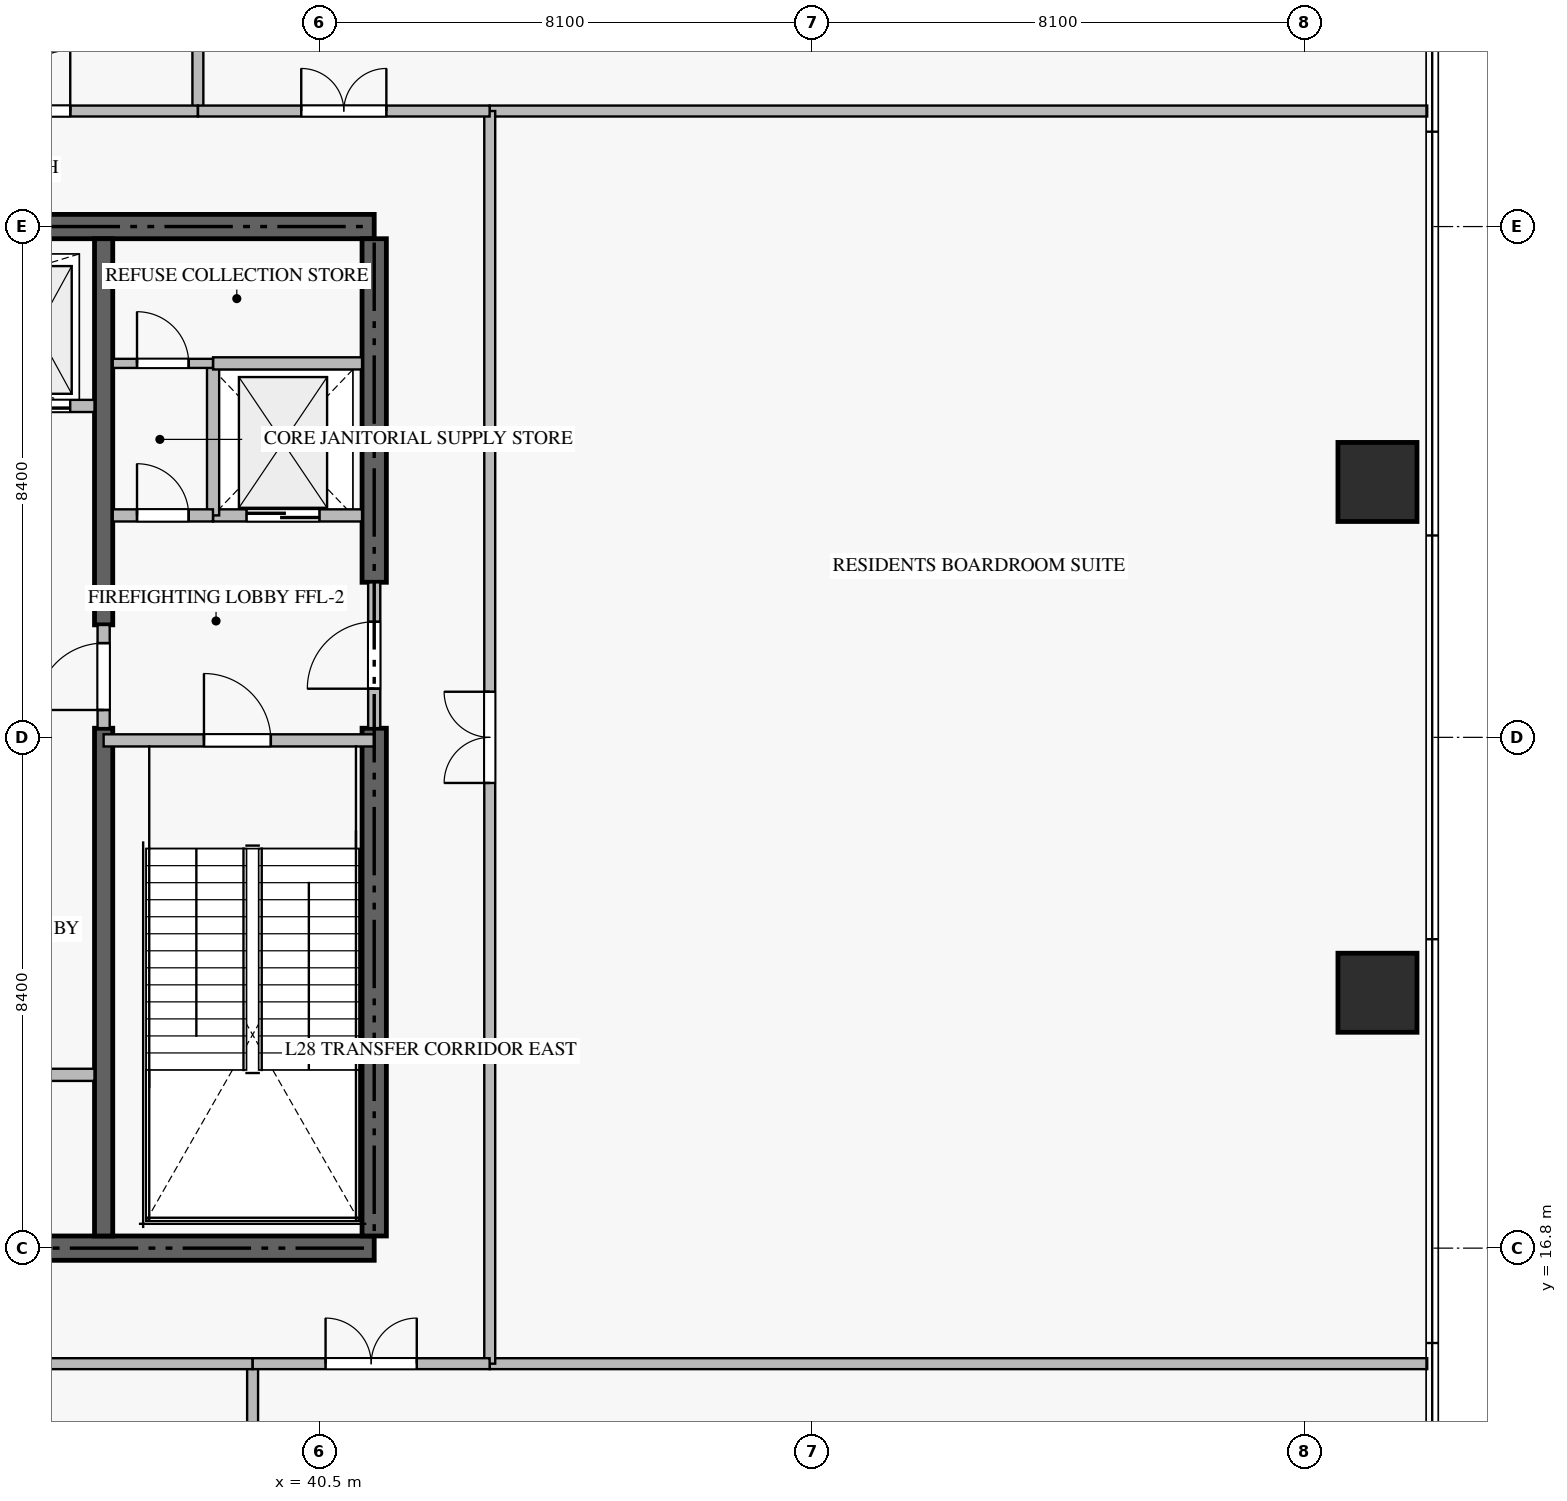
"""IFC4 building model, lengths in metres.
Left out: names, types, materials, properties, quantities, classifications, styles, units other than length and angle.
Written with IfcOpenShell. Run it as: python <this file> out.ifc"""

import sys

from ifc_helpers import new_model, si_unit, direction, frame, frame_2d, origin, origin_2d, place, context, subcontext, project, spatial, rectangle, extrude, source, transform, mapped, element, fill, save


model = new_model("IFC4")
c1 = context("Model", 3, precision=1e-05, world=origin(), true_north=direction((0.0, 1.0)))
c2 = subcontext(c1, "Body", "Model", "MODEL_VIEW")
j1 = project(units=[si_unit("LENGTHUNIT", "METRE"), si_unit("PLANEANGLEUNIT", "RADIAN")], contexts=[c1])
p1 = place(None, origin())
s1 = spatial("IfcSite", under=j1, at=p1, CompositionType="ELEMENT")
p2 = place(p1, origin())
s2 = spatial("IfcBuilding", under=s1, at=p2, CompositionType="ELEMENT")
p3 = place(p2, frame((0.0, 0.0, 115.2)))
s3 = spatial("IfcBuildingStorey", under=s2, at=p3, CompositionType="ELEMENT", Elevation=115.2)
for number, where, z_axis, x_axis in (
    (1, (23.4, 16.8, -0.36), (0.0, 0.0, 1.0), (1.0, 0.0, 0.0)),
    (2, (41.4, 33.6, -0.36), (0.0, 0.0, 1.0), (-1.0, 0.0, 0.0)),
):
    element("IfcWall", number, at=place(p3, frame(where, z_axis=z_axis, x_axis=x_axis)), inside=s3, PredefinedType="SHEAR", context=c2, shape_type="SweptSolid", body=[
        extrude(rectangle(XDim=18.0, YDim=0.4, at=frame_2d((9.0, 0.0))), origin(), (0.0, 0.0, 1.0), 4.868),
    ])
p4 = place(p3, frame((41.4, 17.0, -0.36), z_axis=(0.0, 0.0, 1.0), x_axis=(0.0, 1.0, 0.0)))
e3 = element("IfcWall", 3, at=p4, inside=s3, PredefinedType="SHEAR", context=c2, shape_type="SweptSolid", body=[
    extrude(rectangle(XDim=8.35, YDim=0.4, at=frame_2d((4.175, 0.0))), origin(), (0.0, 0.0, 1.0), 4.868),
])
p5 = place(p3, frame((41.4, 27.75, -0.36), z_axis=(0.0, 0.0, 1.0), x_axis=(0.0, 1.0, 0.0)))
e4 = element("IfcWall", 4, at=p5, inside=s3, PredefinedType="SHEAR", context=c2, shape_type="SweptSolid", body=[
    extrude(rectangle(XDim=5.65, YDim=0.4, at=frame_2d((2.825, 0.0))), origin(), (0.0, 0.0, 1.0), 4.868),
])
p6 = place(p3, frame((36.95, 17.0, -0.36), z_axis=(0.0, 0.0, 1.0), x_axis=(0.0, 1.0, 0.0)))
e5 = element("IfcWall", 5, at=p6, inside=s3, PredefinedType="SHEAR", context=c2, shape_type="SweptSolid", body=[
    extrude(rectangle(XDim=8.35, YDim=0.3, at=frame_2d((4.175, 0.0))), origin(), (0.0, 0.0, 1.0), 4.868),
])
p7 = place(p3, frame((36.95, 27.05, -0.36), z_axis=(0.0, 0.0, 1.0), x_axis=(0.0, 1.0, 0.0)))
e6 = element("IfcWall", 6, at=p7, inside=s3, PredefinedType="SHEAR", context=c2, shape_type="SweptSolid", body=[
    extrude(rectangle(XDim=6.35, YDim=0.3, at=frame_2d((3.175, 0.0))), origin(), (0.0, 0.0, 1.0), 4.868),
])
m1 = source(origin(), c2, "Body", "SweptSolid", [
    extrude(rectangle(XDim=1.3, YDim=1.3, at=origin_2d()), origin(), (0.0, 0.0, 1.0), 4.87),
])
for number, where, z_axis, x_axis in (
    (7, (57.9, 21.0, -0.36), (0.0, 0.0, 1.0), (1.0, 0.0, 0.0)),
    (8, (57.9, 29.4, -0.36), (0.0, 0.0, 1.0), (1.0, 0.0, 0.0)),
):
    element("IfcColumn", number, at=place(p3, frame(where, z_axis=z_axis, x_axis=x_axis)), inside=s3, PredefinedType="COLUMN", context=c2, shape_type="MappedRepresentation", body=[
        mapped(m1, transform((0.0, 0.0, 0.0), scale=1.0)),
    ])
p8 = place(p3, frame((36.95, 25.15, 0.0), z_axis=(0.0, 0.0, 1.0), x_axis=(1.0, 0.0, 0.0)))
e9 = element("IfcWall", 9, at=p8, inside=s3, PredefinedType="STANDARD", context=c2, shape_type="SweptSolid", body=[
    extrude(rectangle(XDim=4.45, YDim=0.2, at=frame_2d((2.225, 0.0))), origin(), (0.0, 0.0, 1.0), 4.51),
])
p9 = place(p8, frame((1.65, 0.0, 0.0)))
e10 = element("IfcOpeningElement", 10, at=p9, cuts=e9, PredefinedType="OPENING", context=c2, shape_type="SweptSolid", body=[
    extrude(rectangle(XDim=1.1, YDim=2.15, at=frame_2d((0.55, 1.075))), frame((0.0, 0.11, 0.0), z_axis=(0.0, -1.0, 0.0), x_axis=(1.0, 0.0, 0.0)), (0.0, 0.0, 1.0), 0.22),
])
p10 = place(p3, frame((38.75, 28.85, 0.0), z_axis=(0.0, 0.0, 1.0), x_axis=(1.0, 0.0, 0.0)))
e11 = element("IfcWall", 11, at=p10, inside=s3, PredefinedType="STANDARD", context=c2, shape_type="SweptSolid", body=[
    extrude(rectangle(XDim=2.45, YDim=0.2, at=frame_2d((1.225, 0.0))), origin(), (0.0, 0.0, 1.0), 4.51),
])
p11 = place(p10, frame((0.55, 0.0, 0.0)))
e12 = element("IfcOpeningElement", 12, at=p11, cuts=e11, PredefinedType="OPENING", context=c2, shape_type="SweptSolid", body=[
    extrude(rectangle(XDim=1.2, YDim=2.2, at=frame_2d((0.6, 1.1))), frame((0.0, 0.11, 0.0), z_axis=(0.0, -1.0, 0.0), x_axis=(1.0, 0.0, 0.0)), (0.0, 0.0, 1.0), 0.22),
])
p12 = place(p3, frame((33.05, 19.65, 0.0), z_axis=(0.0, 0.0, 1.0), x_axis=(1.0, 0.0, 0.0)))
e13 = element("IfcWall", 13, at=p12, inside=s3, PredefinedType="STANDARD", context=c2, shape_type="SweptSolid", body=[
    extrude(rectangle(XDim=3.75, YDim=0.2, at=frame_2d((1.875, 0.0))), origin(), (0.0, 0.0, 1.0), 4.51),
])
p13 = place(p12, frame((0.65, 0.0, 0.0)))
e14 = element("IfcOpeningElement", 14, at=p13, cuts=e13, PredefinedType="OPENING", context=c2, shape_type="SweptSolid", body=[
    extrude(rectangle(XDim=1.1, YDim=2.2, at=frame_2d((0.55, 1.1))), frame((0.0, 0.11, 0.0), z_axis=(0.0, -1.0, 0.0), x_axis=(1.0, 0.0, 0.0)), (0.0, 0.0, 1.0), 0.22),
])
p14 = place(p3, frame((35.0, 30.65, 0.0), z_axis=(0.0, 0.0, 1.0), x_axis=(1.0, 0.0, 0.0)))
e15 = element("IfcWall", 15, at=p14, inside=s3, PredefinedType="STANDARD", context=c2, shape_type="SweptSolid", body=[
    extrude(rectangle(XDim=1.8, YDim=0.2, at=frame_2d((0.9, 0.0))), origin(), (0.0, 0.0, 1.0), 4.51),
])
p15 = place(p14, frame((0.3, 0.0, 0.0)))
e16 = element("IfcOpeningElement", 16, at=p15, cuts=e15, PredefinedType="OPENING", context=c2, shape_type="SweptSolid", body=[
    extrude(rectangle(XDim=1.1, YDim=2.2, at=frame_2d((0.55, 1.1))), frame((0.0, 0.11, 0.0), z_axis=(0.0, -1.0, 0.0), x_axis=(1.0, 0.0, 0.0)), (0.0, 0.0, 1.0), 0.22),
])
p16 = place(p3, frame((38.75, 28.85, 0.0), z_axis=(0.0, 0.0, 1.0), x_axis=(0.0, 1.0, 0.0)))
e17 = element("IfcWall", 17, at=p16, inside=s3, PredefinedType="STANDARD", context=c2, shape_type="SweptSolid", body=[
    extrude(rectangle(XDim=2.5, YDim=0.2, at=frame_2d((1.25, 0.0))), origin(), (0.0, 0.0, 1.0), 4.51),
])
p17 = place(p3, frame((38.75, 31.35, 0.0), z_axis=(0.0, 0.0, 1.0), x_axis=(1.0, 0.0, 0.0)))
e18 = element("IfcWall", 18, at=p17, inside=s3, PredefinedType="STANDARD", context=c2, shape_type="SweptSolid", body=[
    extrude(rectangle(XDim=2.45, YDim=0.2, at=frame_2d((1.225, 0.0))), origin(), (0.0, 0.0, 1.0), 4.51),
])
p18 = place(p3, frame((37.1, 28.85, 0.0), z_axis=(0.0, 0.0, 1.0), x_axis=(1.0, 0.0, 0.0)))
e19 = element("IfcWall", 19, at=p18, inside=s3, PredefinedType="STANDARD", context=c2, shape_type="SweptSolid", body=[
    extrude(rectangle(XDim=1.648, YDim=0.2, at=frame_2d((0.824, 0.0))), origin(), (0.0, 0.0, 1.0), 4.51),
])
p19 = place(p18, frame((0.399, 0.0, 0.0)))
e20 = element("IfcOpeningElement", 20, at=p19, cuts=e19, PredefinedType="OPENING", context=c2, shape_type="SweptSolid", body=[
    extrude(rectangle(XDim=0.85, YDim=2.1, at=frame_2d((0.425, 1.05))), frame((0.0, 0.11, 0.0), z_axis=(0.0, -1.0, 0.0), x_axis=(1.0, 0.0, 0.0)), (0.0, 0.0, 1.0), 0.22),
])
p20 = place(p3, frame((41.4, 25.352, 0.0), z_axis=(0.0, 0.0, 1.0), x_axis=(0.0, 1.0, 0.0)))
e21 = element("IfcWall", 21, at=p20, inside=s3, PredefinedType="STANDARD", context=c2, shape_type="SweptSolid", body=[
    extrude(rectangle(XDim=2.396, YDim=0.2, at=frame_2d((1.198, 0.0))), origin(), (0.0, 0.0, 1.0), 4.51),
])
p21 = place(p20, frame((0.648, 0.0, 0.0)))
e22 = element("IfcOpeningElement", 22, at=p21, cuts=e21, PredefinedType="OPENING", context=c2, shape_type="SweptSolid", body=[
    extrude(rectangle(XDim=1.1, YDim=2.15, at=frame_2d((0.55, 1.075))), frame((0.0, 0.11, 0.0), z_axis=(0.0, -1.0, 0.0), x_axis=(1.0, 0.0, 0.0)), (0.0, 0.0, 1.0), 0.22),
])
p22 = place(p3, frame((36.95, 25.352, 0.0), z_axis=(0.0, 0.0, 1.0), x_axis=(0.0, 1.0, 0.0)))
e23 = element("IfcWall", 23, at=p22, inside=s3, PredefinedType="STANDARD", context=c2, shape_type="SweptSolid", body=[
    extrude(rectangle(XDim=1.696, YDim=0.2, at=frame_2d((0.848, 0.0))), origin(), (0.0, 0.0, 1.0), 4.51),
])
p23 = place(p22, frame((0.298, 0.0, 0.0)))
e24 = element("IfcOpeningElement", 24, at=p23, cuts=e23, PredefinedType="OPENING", context=c2, shape_type="SweptSolid", body=[
    extrude(rectangle(XDim=1.1, YDim=2.15, at=frame_2d((0.55, 1.075))), frame((0.0, 0.11, 0.0), z_axis=(0.0, -1.0, 0.0), x_axis=(1.0, 0.0, 0.0)), (0.0, 0.0, 1.0), 0.22),
])
p24 = place(p3, frame((37.1, 31.35, 0.0), z_axis=(0.0, 0.0, 1.0), x_axis=(1.0, 0.0, 0.0)))
e25 = element("IfcWall", 25, at=p24, inside=s3, PredefinedType="PARTITIONING", context=c2, shape_type="SweptSolid", body=[
    extrude(rectangle(XDim=1.648, YDim=0.15, at=frame_2d((0.824, 0.0))), origin(), (0.0, 0.0, 1.0), 4.51),
])
p25 = place(p24, frame((0.399, 0.0, 0.0)))
e26 = element("IfcOpeningElement", 26, at=p25, cuts=e25, PredefinedType="OPENING", context=c2, shape_type="SweptSolid", body=[
    extrude(rectangle(XDim=0.85, YDim=2.1, at=frame_2d((0.425, 1.05))), frame((0.0, 0.085, 0.0), z_axis=(0.0, -1.0, 0.0), x_axis=(1.0, 0.0, 0.0)), (0.0, 0.0, 1.0), 0.17),
])
for number, where, z_axis, x_axis in (
    (27, (43.3, 14.9, 0.0), (0.0, 0.0, 1.0), (1.0, 0.0, 0.0)),
    (28, (43.3, 35.5, 0.0), (0.0, 0.0, 1.0), (1.0, 0.0, 0.0)),
):
    element("IfcWall", number, at=place(p3, frame(where, z_axis=z_axis, x_axis=x_axis)), inside=s3, PredefinedType="PARTITIONING", context=c2, shape_type="SweptSolid", body=[
        extrude(rectangle(XDim=15.418, YDim=0.18, at=frame_2d((7.709, 0.0))), origin(), (0.0, 0.0, 1.0), 4.51),
    ])
p26 = place(p3, frame((43.3, 14.9, 0.0), z_axis=(0.0, 0.0, 1.0), x_axis=(0.0, 1.0, 0.0)))
e29 = element("IfcWall", 29, at=p26, inside=s3, PredefinedType="PARTITIONING", context=c2, shape_type="SweptSolid", body=[
    extrude(rectangle(XDim=20.6, YDim=0.18, at=frame_2d((10.3, 0.0))), origin(), (0.0, 0.0, 1.0), 4.51),
])
p27 = place(p26, frame((9.55, 0.0, 0.0)))
e30 = element("IfcOpeningElement", 30, at=p27, cuts=e29, PredefinedType="OPENING", context=c2, shape_type="SweptSolid", body=[
    extrude(rectangle(XDim=1.5, YDim=2.25, at=frame_2d((0.75, 1.125))), frame((0.0, 0.1, 0.0), z_axis=(0.0, -1.0, 0.0), x_axis=(1.0, 0.0, 0.0)), (0.0, 0.0, 1.0), 0.2),
])
for number, where, z_axis, x_axis in (
    (31, (39.4, 0.282, 0.0), (0.0, 0.0, 1.0), (0.0, 1.0, 0.0)),
    (32, (38.5, 35.5, 0.0), (0.0, 0.0, 1.0), (0.0, 1.0, 0.0)),
):
    element("IfcWall", number, at=place(p3, frame(where, z_axis=z_axis, x_axis=x_axis)), inside=s3, PredefinedType="PARTITIONING", context=c2, shape_type="SweptSolid", body=[
        extrude(rectangle(XDim=14.618, YDim=0.18, at=frame_2d((7.309, 0.0))), origin(), (0.0, 0.0, 1.0), 4.51),
    ])
p28 = place(p3, frame((25.602, 14.9, 0.0), z_axis=(0.0, 0.0, 1.0), x_axis=(1.0, 0.0, 0.0)))
e33 = element("IfcWall", 33, at=p28, inside=s3, PredefinedType="PARTITIONING", context=c2, shape_type="SweptSolid", body=[
    extrude(rectangle(XDim=13.798, YDim=0.18, at=frame_2d((6.899, 0.0))), origin(), (0.0, 0.0, 1.0), 4.51),
])
p29 = place(p28, frame((6.099, 0.0, 0.0)))
e34 = element("IfcOpeningElement", 34, at=p29, cuts=e33, PredefinedType="OPENING", context=c2, shape_type="SweptSolid", body=[
    extrude(rectangle(XDim=1.6, YDim=2.3, at=frame_2d((0.8, 1.15))), frame((0.0, 0.1, 0.0), z_axis=(0.0, -1.0, 0.0), x_axis=(1.0, 0.0, 0.0)), (0.0, 0.0, 1.0), 0.2),
])
p30 = place(p3, frame((39.402, 14.9, 0.0), z_axis=(0.0, 0.0, 1.0), x_axis=(1.0, 0.0, 0.0)))
e35 = element("IfcWall", 35, at=p30, inside=s3, PredefinedType="PARTITIONING", context=c2, shape_type="SweptSolid", body=[
    extrude(rectangle(XDim=3.896, YDim=0.18, at=frame_2d((1.948, 0.0))), origin(), (0.0, 0.0, 1.0), 4.51),
])
p31 = place(p30, frame((1.198, 0.0, 0.0)))
e36 = element("IfcOpeningElement", 36, at=p31, cuts=e35, PredefinedType="OPENING", context=c2, shape_type="SweptSolid", body=[
    extrude(rectangle(XDim=1.5, YDim=2.25, at=frame_2d((0.75, 1.125))), frame((0.0, 0.1, 0.0), z_axis=(0.0, -1.0, 0.0), x_axis=(1.0, 0.0, 0.0)), (0.0, 0.0, 1.0), 0.2),
])
p32 = place(p3, frame((33.302, 35.5, 0.0), z_axis=(0.0, 0.0, 1.0), x_axis=(1.0, 0.0, 0.0)))
e37 = element("IfcWall", 37, at=p32, inside=s3, PredefinedType="PARTITIONING", context=c2, shape_type="SweptSolid", body=[
    extrude(rectangle(XDim=5.198, YDim=0.18, at=frame_2d((2.599, 0.0))), origin(), (0.0, 0.0, 1.0), 4.51),
])
p33 = place(p32, frame((2.099, 0.0, 0.0)))
e38 = element("IfcOpeningElement", 38, at=p33, cuts=e37, PredefinedType="OPENING", context=c2, shape_type="SweptSolid", body=[
    extrude(rectangle(XDim=1.0, YDim=2.15, at=frame_2d((0.5, 1.075))), frame((0.0, 0.1, 0.0), z_axis=(0.0, -1.0, 0.0), x_axis=(1.0, 0.0, 0.0)), (0.0, 0.0, 1.0), 0.2),
])
p34 = place(p3, frame((38.502, 35.5, 0.0), z_axis=(0.0, 0.0, 1.0), x_axis=(1.0, 0.0, 0.0)))
e39 = element("IfcWall", 39, at=p34, inside=s3, PredefinedType="PARTITIONING", context=c2, shape_type="SweptSolid", body=[
    extrude(rectangle(XDim=4.796, YDim=0.18, at=frame_2d((2.398, 0.0))), origin(), (0.0, 0.0, 1.0), 4.51),
])
p35 = place(p34, frame((1.698, 0.0, 0.0)))
e40 = element("IfcOpeningElement", 40, at=p35, cuts=e39, PredefinedType="OPENING", context=c2, shape_type="SweptSolid", body=[
    extrude(rectangle(XDim=1.4, YDim=2.25, at=frame_2d((0.7, 1.125))), frame((0.0, 0.1, 0.0), z_axis=(0.0, -1.0, 0.0), x_axis=(1.0, 0.0, 0.0)), (0.0, 0.0, 1.0), 0.2),
])
m2 = source(origin(), c2, "Body", "SweptSolid", [
    extrude(rectangle(XDim=1.1, YDim=2.15, at=frame_2d((0.55, 1.075))), frame((0.0, 0.025, 0.0), z_axis=(0.0, -1.0, 0.0), x_axis=(1.0, 0.0, 0.0)), (0.0, 0.0, 1.0), 0.05),
])
p36 = place(p9, origin())
e41 = element("IfcDoor", 41, at=p36, inside=s3, OperationType="SINGLE_SWING_LEFT", PredefinedType="DOOR", context=c2, shape_type="MappedRepresentation", body=[
    mapped(m2, transform((0.0, 0.0, 0.0), scale=1.0)),
])
fill(e10, e41)
m3 = source(origin(), c2, "Body", "SweptSolid", [
    extrude(rectangle(XDim=1.2, YDim=2.2, at=frame_2d((0.6, 1.1))), frame((0.0, 0.025, 0.0), z_axis=(0.0, -1.0, 0.0), x_axis=(1.0, 0.0, 0.0)), (0.0, 0.0, 1.0), 0.05),
])
p37 = place(p11, origin())
e42 = element("IfcDoor", 42, at=p37, inside=s3, OperationType="DOUBLE_DOOR_SLIDING", PredefinedType="DOOR", context=c2, shape_type="MappedRepresentation", body=[
    mapped(m3, transform((0.0, 0.0, 0.0), scale=1.0)),
])
fill(e12, e42)
m4 = source(origin(), c2, "Body", "SweptSolid", [
    extrude(rectangle(XDim=1.1, YDim=2.2, at=frame_2d((0.55, 1.1))), frame((0.0, 0.025, 0.0), z_axis=(0.0, -1.0, 0.0), x_axis=(1.0, 0.0, 0.0)), (0.0, 0.0, 1.0), 0.05),
])
p38 = place(p15, origin())
e43 = element("IfcDoor", 43, at=p38, inside=s3, OperationType="DOUBLE_DOOR_SLIDING", PredefinedType="DOOR", context=c2, shape_type="MappedRepresentation", body=[
    mapped(m4, transform((0.0, 0.0, 0.0), scale=1.0)),
])
fill(e16, e43)
m5 = source(origin(), c2, "Body", "SweptSolid", [
    extrude(rectangle(XDim=0.85, YDim=2.1, at=frame_2d((0.425, 1.05))), frame((0.0, 0.025, 0.0), z_axis=(0.0, -1.0, 0.0), x_axis=(1.0, 0.0, 0.0)), (0.0, 0.0, 1.0), 0.05),
])
p39 = place(p19, origin())
e44 = element("IfcDoor", 44, at=p39, inside=s3, OperationType="SINGLE_SWING_LEFT", PredefinedType="DOOR", context=c2, shape_type="MappedRepresentation", body=[
    mapped(m5, transform((0.0, 0.0, 0.0), scale=1.0)),
])
fill(e20, e44)
p40 = place(p21, origin())
e45 = element("IfcDoor", 45, at=p40, inside=s3, OperationType="SINGLE_SWING_LEFT", PredefinedType="DOOR", context=c2, shape_type="MappedRepresentation", body=[
    mapped(m2, transform((0.0, 0.0, 0.0), scale=1.0)),
])
fill(e22, e45)
p41 = place(p23, origin())
e46 = element("IfcDoor", 46, at=p41, inside=s3, OperationType="SINGLE_SWING_LEFT", PredefinedType="DOOR", context=c2, shape_type="MappedRepresentation", body=[
    mapped(m2, transform((0.0, 0.0, 0.0), scale=1.0)),
])
fill(e24, e46)
p42 = place(p25, origin())
e47 = element("IfcDoor", 47, at=p42, inside=s3, OperationType="SINGLE_SWING_LEFT", PredefinedType="DOOR", context=c2, shape_type="MappedRepresentation", body=[
    mapped(m5, transform((0.0, 0.0, 0.0), scale=1.0)),
])
fill(e26, e47)
m6 = source(origin(), c2, "Body", "SweptSolid", [
    extrude(rectangle(XDim=1.5, YDim=2.25, at=frame_2d((0.75, 1.125))), frame((0.0, 0.025, 0.0), z_axis=(0.0, -1.0, 0.0), x_axis=(1.0, 0.0, 0.0)), (0.0, 0.0, 1.0), 0.05),
])
p43 = place(p27, origin())
e48 = element("IfcDoor", 48, at=p43, inside=s3, OperationType="DOUBLE_DOOR_SINGLE_SWING", PredefinedType="DOOR", context=c2, shape_type="MappedRepresentation", body=[
    mapped(m6, transform((0.0, 0.0, 0.0), scale=1.0)),
])
fill(e30, e48)
p44 = place(p31, origin())
e49 = element("IfcDoor", 49, at=p44, inside=s3, OperationType="DOUBLE_DOOR_SINGLE_SWING", PredefinedType="DOOR", context=c2, shape_type="MappedRepresentation", body=[
    mapped(m6, transform((0.0, 0.0, 0.0), scale=1.0)),
])
fill(e36, e49)
m7 = source(origin(), c2, "Body", "SweptSolid", [
    extrude(rectangle(XDim=1.0, YDim=2.15, at=frame_2d((0.5, 1.075))), frame((0.0, 0.025, 0.0), z_axis=(0.0, -1.0, 0.0), x_axis=(1.0, 0.0, 0.0)), (0.0, 0.0, 1.0), 0.05),
])
p45 = place(p33, origin())
e50 = element("IfcDoor", 50, at=p45, inside=s3, OperationType="SINGLE_SWING_RIGHT", PredefinedType="DOOR", context=c2, shape_type="MappedRepresentation", body=[
    mapped(m7, transform((0.0, 0.0, 0.0), scale=1.0)),
])
fill(e38, e50)
m8 = source(origin(), c2, "Body", "SweptSolid", [
    extrude(rectangle(XDim=1.4, YDim=2.25, at=frame_2d((0.7, 1.125))), frame((0.0, 0.025, 0.0), z_axis=(0.0, -1.0, 0.0), x_axis=(1.0, 0.0, 0.0)), (0.0, 0.0, 1.0), 0.05),
])
p46 = place(p35, origin())
e51 = element("IfcDoor", 51, at=p46, inside=s3, OperationType="DOUBLE_DOOR_SINGLE_SWING", PredefinedType="DOOR", context=c2, shape_type="MappedRepresentation", body=[
    mapped(m8, transform((0.0, 0.0, 0.0), scale=1.0)),
])
fill(e40, e51)
save(model, sys.argv[1])
